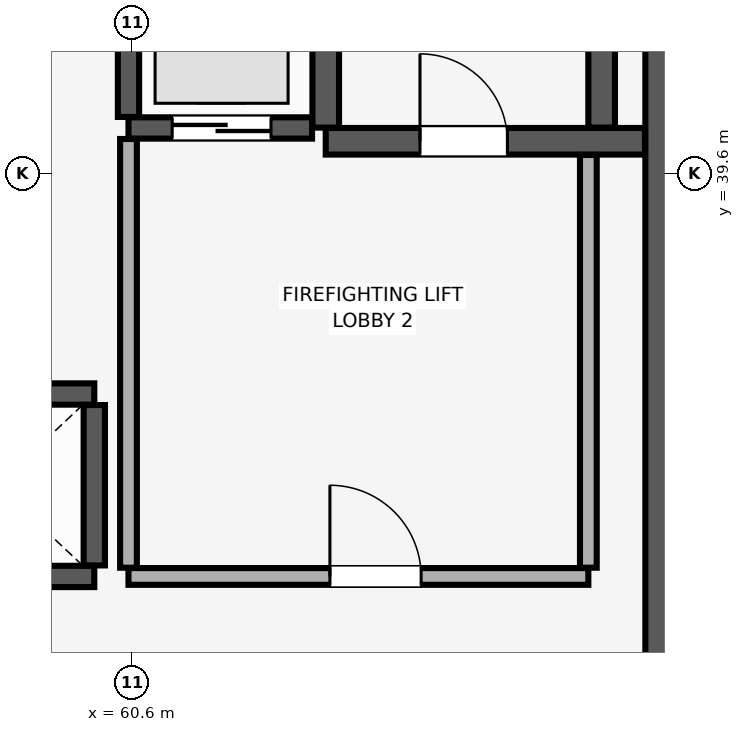
"""IFC4 building model, lengths in metres.
Left out: names, types, materials, properties, quantities, classifications, styles, units other than length and angle.
Written with IfcOpenShell. Run it as: python <this file> out.ifc"""

import sys

from ifc_helpers import new_model, si_unit, direction, frame, frame_2d, origin, place, context, subcontext, project, spatial, rectangle, extrude, element, fill, save


model = new_model("IFC4")
c1 = context("Model", 3, precision=1e-05, world=origin(), true_north=direction((0.0, 1.0)))
c2 = subcontext(c1, "Body", "Model", "MODEL_VIEW")
j1 = project(units=[si_unit("LENGTHUNIT", "METRE"), si_unit("PLANEANGLEUNIT", "RADIAN")], contexts=[c1])
p1 = place(None, origin())
s1 = spatial("IfcSite", under=j1, at=p1, CompositionType="ELEMENT")
p2 = place(p1, origin())
s2 = spatial("IfcBuilding", under=s1, at=p2, CompositionType="ELEMENT")
p3 = place(p2, frame((0.0, 0.0, 180.95)))
s3 = spatial("IfcBuildingStorey", under=s2, at=p3, CompositionType="ELEMENT", Elevation=180.95)
p4 = place(p3, frame((67.8, 29.4, 0.0), z_axis=(0.0, 0.0, 1.0), x_axis=(0.0, 1.0, 0.0)))
e1 = element("IfcWall", 1, at=p4, inside=s3, PredefinedType="SHEAR", context=c2, shape_type="SweptSolid", body=[
    extrude(rectangle(XDim=19.2, YDim=0.9, at=frame_2d((9.6, 0.0))), origin(), (0.0, 0.0, 1.0), 3.45),
])
p5 = place(p3, frame((63.145, 40.025, 0.0), z_axis=(0.0, 0.0, 1.0), x_axis=(1.0, 0.0, 0.0)))
e2 = element("IfcWall", 2, at=p5, inside=s3, PredefinedType="SHEAR", context=c2, shape_type="SweptSolid", body=[
    extrude(rectangle(XDim=4.2, YDim=0.35, at=frame_2d((2.1, 0.0))), origin(), (0.0, 0.0, 1.0), 3.45),
])
p6 = place(p5, frame((1.24, 0.0, 0.0)))
e3 = element("IfcOpeningElement", 3, at=p6, cuts=e2, PredefinedType="OPENING", context=c2, shape_type="SweptSolid", body=[
    extrude(rectangle(XDim=1.15, YDim=2.15, at=frame_2d((0.575, 1.075))), frame((0.0, 0.185, 0.0), z_axis=(0.0, -1.0, 0.0), x_axis=(1.0, 0.0, 0.0)), (0.0, 0.0, 1.0), 0.37),
])
for number, where, z_axis, x_axis in (
    (4, (63.145, 40.205, 0.0), (0.0, 0.0, 1.0), (0.0, 1.0, 0.0)),
    (5, (66.775, 40.205, 0.0), (0.0, 0.0, 1.0), (0.0, 1.0, 0.0)),
):
    element("IfcWall", number, at=place(p3, frame(where, z_axis=z_axis, x_axis=x_axis)), inside=s3, PredefinedType="SHEAR", context=c2, shape_type="SweptSolid", body=[
        extrude(rectangle(XDim=8.09, YDim=0.35, at=frame_2d((4.045, 0.0))), origin(), (0.0, 0.0, 1.0), 3.45),
    ])
for number, where, z_axis, x_axis in (
    (6, (57.55, 34.3, 0.0), (0.0, 0.0, 1.0), (1.0, 0.0, 0.0)),
    (7, (57.55, 36.7, 0.0), (0.0, 0.0, 1.0), (1.0, 0.0, 0.0)),
):
    element("IfcWall", number, at=place(p3, frame(where, z_axis=z_axis, x_axis=x_axis)), inside=s3, PredefinedType="SHEAR", context=c2, shape_type="SweptSolid", body=[
        extrude(rectangle(XDim=2.55, YDim=0.28, at=frame_2d((1.275, 0.0))), origin(), (0.0, 0.0, 1.0), 3.45),
    ])
p7 = place(p3, frame((60.1, 34.445, 0.0), z_axis=(0.0, 0.0, 1.0), x_axis=(0.0, 1.0, 0.0)))
e8 = element("IfcWall", 8, at=p7, inside=s3, PredefinedType="SHEAR", context=c2, shape_type="SweptSolid", body=[
    extrude(rectangle(XDim=2.11, YDim=0.28, at=frame_2d((1.055, 0.0))), origin(), (0.0, 0.0, 1.0), 3.45),
])
p8 = place(p3, frame((60.55, 40.2, 0.0), z_axis=(0.0, 0.0, 1.0), x_axis=(1.0, 0.0, 0.0)))
e9 = element("IfcWall", 9, at=p8, inside=s3, PredefinedType="SHEAR", context=c2, shape_type="SweptSolid", body=[
    extrude(rectangle(XDim=2.415, YDim=0.28, at=frame_2d((1.208, 0.0))), origin(), (0.0, 0.0, 1.0), 3.45),
])
p9 = place(p8, frame((0.575, 0.0, 0.0)))
e10 = element("IfcOpeningElement", 10, at=p9, cuts=e9, PredefinedType="OPENING", context=c2, shape_type="SweptSolid", body=[
    extrude(rectangle(XDim=1.3, YDim=2.3, at=frame_2d((0.65, 1.15))), frame((0.0, 0.15, 0.0), z_axis=(0.0, -1.0, 0.0), x_axis=(1.0, 0.0, 0.0)), (0.0, 0.0, 1.0), 0.3),
])
p10 = place(p3, frame((60.55, 40.345, 0.0), z_axis=(0.0, 0.0, 1.0), x_axis=(0.0, 1.0, 0.0)))
e11 = element("IfcWall", 11, at=p10, inside=s3, PredefinedType="SHEAR", context=c2, shape_type="SweptSolid", body=[
    extrude(rectangle(XDim=2.81, YDim=0.28, at=frame_2d((1.405, 0.0))), origin(), (0.0, 0.0, 1.0), 3.45),
])
p11 = place(p3, frame((60.55, 34.3, 0.0), z_axis=(0.0, 0.0, 1.0), x_axis=(1.0, 0.0, 0.0)))
e12 = element("IfcWall", 12, at=p11, inside=s3, PredefinedType="PARTITIONING", context=c2, shape_type="SweptSolid", body=[
    extrude(rectangle(XDim=6.05, YDim=0.22, at=frame_2d((3.025, 0.0))), origin(), (0.0, 0.0, 1.0), 3.45),
])
p12 = place(p11, frame((2.65, 0.0, 0.0)))
e13 = element("IfcOpeningElement", 13, at=p12, cuts=e12, PredefinedType="OPENING", context=c2, shape_type="SweptSolid", body=[
    extrude(rectangle(XDim=1.2, YDim=2.15, at=frame_2d((0.6, 1.075))), frame((0.0, 0.12, 0.0), z_axis=(0.0, -1.0, 0.0), x_axis=(1.0, 0.0, 0.0)), (0.0, 0.0, 1.0), 0.24),
])
p13 = place(p3, frame((60.55, 34.415, 0.0), z_axis=(0.0, 0.0, 1.0), x_axis=(0.0, 1.0, 0.0)))
e14 = element("IfcWall", 14, at=p13, inside=s3, PredefinedType="PARTITIONING", context=c2, shape_type="SweptSolid", body=[
    extrude(rectangle(XDim=5.64, YDim=0.22, at=frame_2d((2.82, 0.0))), origin(), (0.0, 0.0, 1.0), 3.45),
])
p14 = place(p3, frame((66.6, 34.415, 0.0), z_axis=(0.0, 0.0, 1.0), x_axis=(0.0, 1.0, 0.0)))
e15 = element("IfcWall", 15, at=p14, inside=s3, PredefinedType="PARTITIONING", context=c2, shape_type="SweptSolid", body=[
    extrude(rectangle(XDim=5.43, YDim=0.22, at=frame_2d((2.715, 0.0))), origin(), (0.0, 0.0, 1.0), 3.45),
])
p15 = place(p6, origin())
e16 = element("IfcDoor", 16, at=p15, inside=s3, OperationType="SINGLE_SWING_LEFT", PredefinedType="DOOR", context=c2, shape_type="SweptSolid", body=[
    extrude(rectangle(XDim=1.15, YDim=2.15, at=frame_2d((0.575, 1.075))), frame((0.0, 0.025, 0.0), z_axis=(0.0, -1.0, 0.0), x_axis=(1.0, 0.0, 0.0)), (0.0, 0.0, 1.0), 0.05),
])
fill(e3, e16)
p16 = place(p9, origin())
e17 = element("IfcDoor", 17, at=p16, inside=s3, OperationType="DOUBLE_DOOR_SLIDING", PredefinedType="DOOR", context=c2, shape_type="SweptSolid", body=[
    extrude(rectangle(XDim=1.3, YDim=2.3, at=frame_2d((0.65, 1.15))), frame((0.0, 0.025, 0.0), z_axis=(0.0, -1.0, 0.0), x_axis=(1.0, 0.0, 0.0)), (0.0, 0.0, 1.0), 0.05),
])
fill(e10, e17)
p17 = place(p12, origin())
e18 = element("IfcDoor", 18, at=p17, inside=s3, OperationType="SINGLE_SWING_LEFT", PredefinedType="DOOR", context=c2, shape_type="SweptSolid", body=[
    extrude(rectangle(XDim=1.2, YDim=2.15, at=frame_2d((0.6, 1.075))), frame((0.0, 0.025, 0.0), z_axis=(0.0, -1.0, 0.0), x_axis=(1.0, 0.0, 0.0)), (0.0, 0.0, 1.0), 0.05),
])
fill(e13, e18)
save(model, sys.argv[1])
